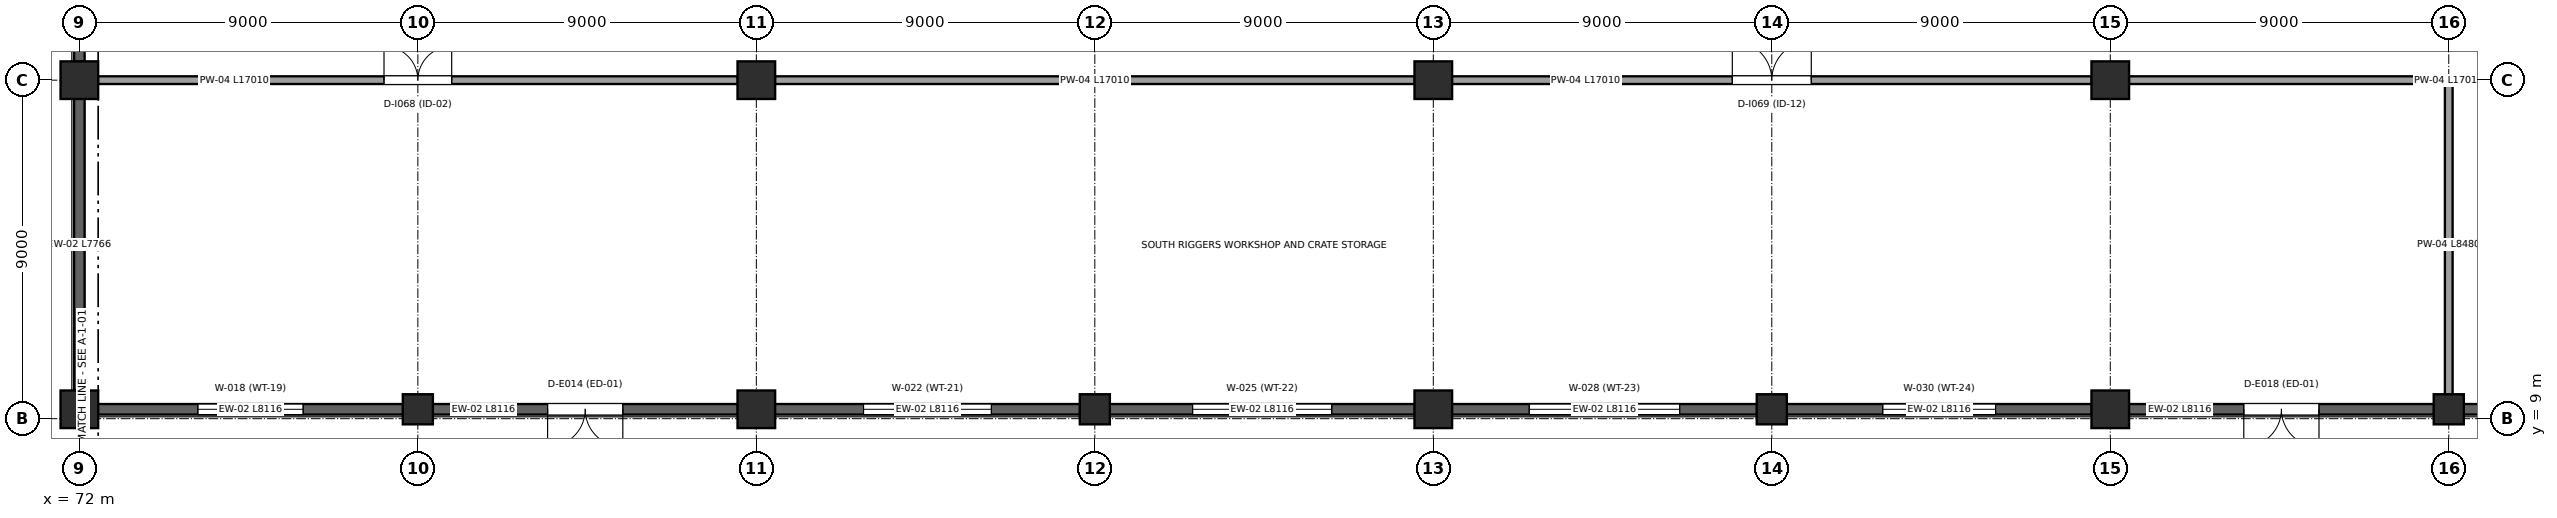
"""IFC4 building model, lengths in metres.
Left out: names, types, materials, properties, quantities, classifications, styles, units other than length and angle.
Written with IfcOpenShell. Run it as: python <this file> out.ifc"""

import sys

from ifc_helpers import new_model, si_unit, direction, frame, frame_2d, origin, origin_2d, place, context, subcontext, project, spatial, rectangle, extrude, element, fill, save


model = new_model("IFC4")
c1 = context("Model", 3, precision=1e-05, world=origin(), true_north=direction((0.0, 1.0)))
c2 = subcontext(c1, "Body", "Model", "MODEL_VIEW")
j1 = project(units=[si_unit("LENGTHUNIT", "METRE"), si_unit("PLANEANGLEUNIT", "RADIAN")], contexts=[c1])
p1 = place(None, origin())
s1 = spatial("IfcSite", under=j1, at=p1, CompositionType="ELEMENT")
p2 = place(p1, origin())
s2 = spatial("IfcBuilding", under=s1, at=p2, CompositionType="ELEMENT")
p3 = place(p2, origin())
s3 = spatial("IfcBuildingStorey", under=s2, at=p3, CompositionType="ELEMENT", Elevation=0.0)
for number, where, z_axis, x_axis in (
    (1, (72.0, 9.25, 0.0), (0.0, 0.0, 1.0), (1.0, 0.0, 0.0)),
    (2, (72.0, 18.0, 0.0), (0.0, 0.0, 1.0), (1.0, 0.0, 0.0)),
    (3, (90.0, 9.25, 0.0), (0.0, 0.0, 1.0), (1.0, 0.0, 0.0)),
    (4, (90.0, 18.0, 0.0), (0.0, 0.0, 1.0), (1.0, 0.0, 0.0)),
    (5, (108.0, 9.25, 0.0), (0.0, 0.0, 1.0), (1.0, 0.0, 0.0)),
    (6, (108.0, 18.0, 0.0), (0.0, 0.0, 1.0), (1.0, 0.0, 0.0)),
    (7, (126.0, 9.25, 0.0), (0.0, 0.0, 1.0), (1.0, 0.0, 0.0)),
    (8, (126.0, 18.0, 0.0), (0.0, 0.0, 1.0), (1.0, 0.0, 0.0)),
):
    element("IfcColumn", number, at=place(p3, frame(where, z_axis=z_axis, x_axis=x_axis)), inside=s3, PredefinedType="COLUMN", context=c2, shape_type="SweptSolid", body=[
        extrude(rectangle(XDim=1.0, YDim=1.0, at=origin_2d()), origin(), (0.0, 0.0, 1.0), 6.0),
    ])
for number, where, z_axis, x_axis in (
    (9, (81.0, 9.25, 0.0), (0.0, 0.0, 1.0), (1.0, 0.0, 0.0)),
    (10, (99.0, 9.25, 0.0), (0.0, 0.0, 1.0), (1.0, 0.0, 0.0)),
    (11, (117.0, 9.25, 0.0), (0.0, 0.0, 1.0), (1.0, 0.0, 0.0)),
    (12, (135.0, 9.25, 0.0), (0.0, 0.0, 1.0), (1.0, 0.0, 0.0)),
):
    element("IfcColumn", number, at=place(p3, frame(where, z_axis=z_axis, x_axis=x_axis)), inside=s3, PredefinedType="COLUMN", context=c2, shape_type="SweptSolid", body=[
        extrude(rectangle(XDim=0.8, YDim=0.8, at=origin_2d()), origin(), (0.0, 0.0, 1.0), 6.0),
    ])
p4 = place(p3, frame((80.608, 9.25, 0.0), z_axis=(0.0, 0.0, 1.0), x_axis=(-1.0, 0.0, 0.0)))
e13 = element("IfcWall", 13, at=p4, inside=s3, PredefinedType="STANDARD", context=c2, shape_type="SweptSolid", body=[
    extrude(rectangle(XDim=8.116, YDim=0.28, at=frame_2d((4.058, 0.0))), origin(), (0.0, 0.0, 1.0), 5.75),
])
p5 = place(p4, frame((2.658, 0.0, 2.6)))
e14 = element("IfcOpeningElement", 14, at=p5, cuts=e13, PredefinedType="OPENING", context=c2, shape_type="SweptSolid", body=[
    extrude(rectangle(XDim=2.8, YDim=1.25, at=frame_2d((1.4, 0.625))), frame((0.0, 0.15, 0.0), z_axis=(0.0, -1.0, 0.0), x_axis=(1.0, 0.0, 0.0)), (0.0, 0.0, 1.0), 0.3),
])
p6 = place(p3, frame((89.508, 9.25, 0.0), z_axis=(0.0, 0.0, 1.0), x_axis=(-1.0, 0.0, 0.0)))
e15 = element("IfcWall", 15, at=p6, inside=s3, PredefinedType="STANDARD", context=c2, shape_type="SweptSolid", body=[
    extrude(rectangle(XDim=8.116, YDim=0.28, at=frame_2d((4.058, 0.0))), origin(), (0.0, 0.0, 1.0), 5.75),
])
p7 = place(p6, frame((3.058, 0.0, 0.0)))
e16 = element("IfcOpeningElement", 16, at=p7, cuts=e15, PredefinedType="OPENING", context=c2, shape_type="SweptSolid", body=[
    extrude(rectangle(XDim=2.0, YDim=2.4, at=frame_2d((1.0, 1.2))), frame((0.0, 0.15, 0.0), z_axis=(0.0, -1.0, 0.0), x_axis=(1.0, 0.0, 0.0)), (0.0, 0.0, 1.0), 0.3),
])
p8 = place(p3, frame((98.608, 9.25, 0.0), z_axis=(0.0, 0.0, 1.0), x_axis=(-1.0, 0.0, 0.0)))
e17 = element("IfcWall", 17, at=p8, inside=s3, PredefinedType="STANDARD", context=c2, shape_type="SweptSolid", body=[
    extrude(rectangle(XDim=8.116, YDim=0.28, at=frame_2d((4.058, 0.0))), origin(), (0.0, 0.0, 1.0), 5.75),
])
p9 = place(p8, frame((2.358, 0.0, 2.6)))
e18 = element("IfcOpeningElement", 18, at=p9, cuts=e17, PredefinedType="OPENING", context=c2, shape_type="SweptSolid", body=[
    extrude(rectangle(XDim=3.4, YDim=1.25, at=frame_2d((1.7, 0.625))), frame((0.0, 0.15, 0.0), z_axis=(0.0, -1.0, 0.0), x_axis=(1.0, 0.0, 0.0)), (0.0, 0.0, 1.0), 0.3),
])
p10 = place(p3, frame((107.508, 9.25, 0.0), z_axis=(0.0, 0.0, 1.0), x_axis=(-1.0, 0.0, 0.0)))
e19 = element("IfcWall", 19, at=p10, inside=s3, PredefinedType="STANDARD", context=c2, shape_type="SweptSolid", body=[
    extrude(rectangle(XDim=8.116, YDim=0.28, at=frame_2d((4.058, 0.0))), origin(), (0.0, 0.0, 1.0), 5.75),
])
p11 = place(p10, frame((2.208, 0.0, 2.6)))
e20 = element("IfcOpeningElement", 20, at=p11, cuts=e19, PredefinedType="OPENING", context=c2, shape_type="SweptSolid", body=[
    extrude(rectangle(XDim=3.7, YDim=1.25, at=frame_2d((1.85, 0.625))), frame((0.0, 0.15, 0.0), z_axis=(0.0, -1.0, 0.0), x_axis=(1.0, 0.0, 0.0)), (0.0, 0.0, 1.0), 0.3),
])
p12 = place(p3, frame((116.608, 9.25, 0.0), z_axis=(0.0, 0.0, 1.0), x_axis=(-1.0, 0.0, 0.0)))
e21 = element("IfcWall", 21, at=p12, inside=s3, PredefinedType="STANDARD", context=c2, shape_type="SweptSolid", body=[
    extrude(rectangle(XDim=8.116, YDim=0.28, at=frame_2d((4.058, 0.0))), origin(), (0.0, 0.0, 1.0), 5.75),
])
p13 = place(p12, frame((2.058, 0.0, 2.6)))
e22 = element("IfcOpeningElement", 22, at=p13, cuts=e21, PredefinedType="OPENING", context=c2, shape_type="SweptSolid", body=[
    extrude(rectangle(XDim=4.0, YDim=1.25, at=frame_2d((2.0, 0.625))), frame((0.0, 0.15, 0.0), z_axis=(0.0, -1.0, 0.0), x_axis=(1.0, 0.0, 0.0)), (0.0, 0.0, 1.0), 0.3),
])
p14 = place(p3, frame((125.508, 9.25, 0.0), z_axis=(0.0, 0.0, 1.0), x_axis=(-1.0, 0.0, 0.0)))
e23 = element("IfcWall", 23, at=p14, inside=s3, PredefinedType="STANDARD", context=c2, shape_type="SweptSolid", body=[
    extrude(rectangle(XDim=8.116, YDim=0.28, at=frame_2d((4.058, 0.0))), origin(), (0.0, 0.0, 1.0), 5.75),
])
p15 = place(p14, frame((2.558, 0.0, 2.6)))
e24 = element("IfcOpeningElement", 24, at=p15, cuts=e23, PredefinedType="OPENING", context=c2, shape_type="SweptSolid", body=[
    extrude(rectangle(XDim=3.0, YDim=1.45, at=frame_2d((1.5, 0.725))), frame((0.0, 0.15, 0.0), z_axis=(0.0, -1.0, 0.0), x_axis=(1.0, 0.0, 0.0)), (0.0, 0.0, 1.0), 0.3),
])
p16 = place(p3, frame((134.608, 9.25, 0.0), z_axis=(0.0, 0.0, 1.0), x_axis=(-1.0, 0.0, 0.0)))
e25 = element("IfcWall", 25, at=p16, inside=s3, PredefinedType="STANDARD", context=c2, shape_type="SweptSolid", body=[
    extrude(rectangle(XDim=8.116, YDim=0.28, at=frame_2d((4.058, 0.0))), origin(), (0.0, 0.0, 1.0), 5.75),
])
p17 = place(p16, frame((3.058, 0.0, 0.0)))
e26 = element("IfcOpeningElement", 26, at=p17, cuts=e25, PredefinedType="OPENING", context=c2, shape_type="SweptSolid", body=[
    extrude(rectangle(XDim=2.0, YDim=2.4, at=frame_2d((1.0, 1.2))), frame((0.0, 0.15, 0.0), z_axis=(0.0, -1.0, 0.0), x_axis=(1.0, 0.0, 0.0)), (0.0, 0.0, 1.0), 0.3),
])
p18 = place(p3, frame((143.508, 9.25, 0.0), z_axis=(0.0, 0.0, 1.0), x_axis=(-1.0, 0.0, 0.0)))
e27 = element("IfcWall", 27, at=p18, inside=s3, PredefinedType="STANDARD", context=c2, shape_type="SweptSolid", body=[
    extrude(rectangle(XDim=8.116, YDim=0.28, at=frame_2d((4.058, 0.0))), origin(), (0.0, 0.0, 1.0), 5.75),
])
p19 = place(p18, frame((2.258, 0.0, 2.6)))
e28 = element("IfcOpeningElement", 28, at=p19, cuts=e27, PredefinedType="OPENING", context=c2, shape_type="SweptSolid", body=[
    extrude(rectangle(XDim=3.6, YDim=1.45, at=frame_2d((1.8, 0.725))), frame((0.0, 0.15, 0.0), z_axis=(0.0, -1.0, 0.0), x_axis=(1.0, 0.0, 0.0)), (0.0, 0.0, 1.0), 0.3),
])
p20 = place(p3, frame((72.0, 9.742, 0.0), z_axis=(0.0, 0.0, 1.0), x_axis=(0.0, 1.0, 0.0)))
e29 = element("IfcWall", 29, at=p20, inside=s3, PredefinedType="STANDARD", context=c2, shape_type="SweptSolid", body=[
    extrude(rectangle(XDim=7.766, YDim=0.28, at=frame_2d((3.883, 0.0))), origin(), (0.0, 0.0, 1.0), 5.75),
])
p21 = place(p3, frame((72.0, 18.492, 0.0), z_axis=(0.0, 0.0, 1.0), x_axis=(0.0, 1.0, 0.0)))
e30 = element("IfcWall", 30, at=p21, inside=s3, PredefinedType="STANDARD", context=c2, shape_type="SweptSolid", body=[
    extrude(rectangle(XDim=8.016, YDim=0.28, at=frame_2d((4.008, 0.0))), origin(), (0.0, 0.0, 1.0), 6.0),
])
p22 = place(p21, frame((2.908, 0.0, 0.0)))
e31 = element("IfcOpeningElement", 31, at=p22, cuts=e30, PredefinedType="OPENING", context=c2, shape_type="SweptSolid", body=[
    extrude(rectangle(XDim=2.2, YDim=2.5, at=frame_2d((1.1, 1.25))), frame((0.0, 0.15, 0.0), z_axis=(0.0, -1.0, 0.0), x_axis=(1.0, 0.0, 0.0)), (0.0, 0.0, 1.0), 0.3),
])
p23 = place(p3, frame((72.495, 18.0, 0.0), z_axis=(0.0, 0.0, 1.0), x_axis=(1.0, 0.0, 0.0)))
e32 = element("IfcWall", 32, at=p23, inside=s3, PredefinedType="PARTITIONING", context=c2, shape_type="SweptSolid", body=[
    extrude(rectangle(XDim=17.01, YDim=0.205, at=frame_2d((8.505, 0.0))), origin(), (0.0, 0.0, 1.0), 4.65),
])
p24 = place(p23, frame((7.605, 0.0, 0.0)))
e33 = element("IfcOpeningElement", 33, at=p24, cuts=e32, PredefinedType="OPENING", context=c2, shape_type="SweptSolid", body=[
    extrude(rectangle(XDim=1.8, YDim=2.3, at=frame_2d((0.9, 1.15))), frame((0.0, 0.113, 0.0), z_axis=(0.0, -1.0, 0.0), x_axis=(1.0, 0.0, 0.0)), (0.0, 0.0, 1.0), 0.225),
])
p25 = place(p3, frame((90.495, 18.0, 0.0), z_axis=(0.0, 0.0, 1.0), x_axis=(1.0, 0.0, 0.0)))
e34 = element("IfcWall", 34, at=p25, inside=s3, PredefinedType="PARTITIONING", context=c2, shape_type="SweptSolid", body=[
    extrude(rectangle(XDim=17.01, YDim=0.205, at=frame_2d((8.505, 0.0))), origin(), (0.0, 0.0, 1.0), 4.65),
])
p26 = place(p3, frame((108.495, 18.0, 0.0), z_axis=(0.0, 0.0, 1.0), x_axis=(1.0, 0.0, 0.0)))
e35 = element("IfcWall", 35, at=p26, inside=s3, PredefinedType="PARTITIONING", context=c2, shape_type="SweptSolid", body=[
    extrude(rectangle(XDim=17.01, YDim=0.205, at=frame_2d((8.505, 0.0))), origin(), (0.0, 0.0, 1.0), 4.65),
])
p27 = place(p26, frame((7.455, 0.0, 0.0)))
e36 = element("IfcOpeningElement", 36, at=p27, cuts=e35, PredefinedType="OPENING", context=c2, shape_type="SweptSolid", body=[
    extrude(rectangle(XDim=2.1, YDim=2.45, at=frame_2d((1.05, 1.225))), frame((0.0, 0.113, 0.0), z_axis=(0.0, -1.0, 0.0), x_axis=(1.0, 0.0, 0.0)), (0.0, 0.0, 1.0), 0.225),
])
p28 = place(p3, frame((126.495, 18.0, 0.0), z_axis=(0.0, 0.0, 1.0), x_axis=(1.0, 0.0, 0.0)))
e37 = element("IfcWall", 37, at=p28, inside=s3, PredefinedType="PARTITIONING", context=c2, shape_type="SweptSolid", body=[
    extrude(rectangle(XDim=17.01, YDim=0.205, at=frame_2d((8.505, 0.0))), origin(), (0.0, 0.0, 1.0), 4.65),
])
p29 = place(p3, frame((135.0, 9.4, 0.0), z_axis=(0.0, 0.0, 1.0), x_axis=(0.0, 1.0, 0.0)))
e38 = element("IfcWall", 38, at=p29, inside=s3, PredefinedType="PARTITIONING", context=c2, shape_type="SweptSolid", body=[
    extrude(rectangle(XDim=8.48, YDim=0.205, at=frame_2d((4.24, 0.0))), origin(), (0.0, 0.0, 1.0), 4.65),
])
p30 = place(p5, origin())
e39 = element("IfcWindow", 39, at=p30, inside=s3, PartitioningType="SINGLE_PANEL", PredefinedType="WINDOW", context=c2, shape_type="SweptSolid", body=[
    extrude(rectangle(XDim=2.8, YDim=1.25, at=frame_2d((1.4, 0.625))), frame((0.0, 0.03, 0.0), z_axis=(0.0, -1.0, 0.0), x_axis=(1.0, 0.0, 0.0)), (0.0, 0.0, 1.0), 0.06),
])
fill(e14, e39)
p31 = place(p7, origin())
e40 = element("IfcDoor", 40, at=p31, inside=s3, OperationType="DOUBLE_DOOR_SINGLE_SWING", PredefinedType="DOOR", context=c2, shape_type="SweptSolid", body=[
    extrude(rectangle(XDim=2.0, YDim=2.4, at=frame_2d((1.0, 1.2))), frame((0.0, 0.025, 0.0), z_axis=(0.0, -1.0, 0.0), x_axis=(1.0, 0.0, 0.0)), (0.0, 0.0, 1.0), 0.05),
])
fill(e16, e40)
p32 = place(p9, origin())
e41 = element("IfcWindow", 41, at=p32, inside=s3, PartitioningType="SINGLE_PANEL", PredefinedType="WINDOW", context=c2, shape_type="SweptSolid", body=[
    extrude(rectangle(XDim=3.4, YDim=1.25, at=frame_2d((1.7, 0.625))), frame((0.0, 0.03, 0.0), z_axis=(0.0, -1.0, 0.0), x_axis=(1.0, 0.0, 0.0)), (0.0, 0.0, 1.0), 0.06),
])
fill(e18, e41)
p33 = place(p11, origin())
e42 = element("IfcWindow", 42, at=p33, inside=s3, PartitioningType="SINGLE_PANEL", PredefinedType="WINDOW", context=c2, shape_type="SweptSolid", body=[
    extrude(rectangle(XDim=3.7, YDim=1.25, at=frame_2d((1.85, 0.625))), frame((0.0, 0.03, 0.0), z_axis=(0.0, -1.0, 0.0), x_axis=(1.0, 0.0, 0.0)), (0.0, 0.0, 1.0), 0.06),
])
fill(e20, e42)
p34 = place(p13, origin())
e43 = element("IfcWindow", 43, at=p34, inside=s3, PartitioningType="SINGLE_PANEL", PredefinedType="WINDOW", context=c2, shape_type="SweptSolid", body=[
    extrude(rectangle(XDim=4.0, YDim=1.25, at=frame_2d((2.0, 0.625))), frame((0.0, 0.03, 0.0), z_axis=(0.0, -1.0, 0.0), x_axis=(1.0, 0.0, 0.0)), (0.0, 0.0, 1.0), 0.06),
])
fill(e22, e43)
p35 = place(p15, origin())
e44 = element("IfcWindow", 44, at=p35, inside=s3, PartitioningType="SINGLE_PANEL", PredefinedType="WINDOW", context=c2, shape_type="SweptSolid", body=[
    extrude(rectangle(XDim=3.0, YDim=1.45, at=frame_2d((1.5, 0.725))), frame((0.0, 0.03, 0.0), z_axis=(0.0, -1.0, 0.0), x_axis=(1.0, 0.0, 0.0)), (0.0, 0.0, 1.0), 0.06),
])
fill(e24, e44)
p36 = place(p17, origin())
e45 = element("IfcDoor", 45, at=p36, inside=s3, OperationType="DOUBLE_DOOR_SINGLE_SWING", PredefinedType="DOOR", context=c2, shape_type="SweptSolid", body=[
    extrude(rectangle(XDim=2.0, YDim=2.4, at=frame_2d((1.0, 1.2))), frame((0.0, 0.025, 0.0), z_axis=(0.0, -1.0, 0.0), x_axis=(1.0, 0.0, 0.0)), (0.0, 0.0, 1.0), 0.05),
])
fill(e26, e45)
p37 = place(p24, origin())
e46 = element("IfcDoor", 46, at=p37, inside=s3, OperationType="DOUBLE_DOOR_SINGLE_SWING", PredefinedType="DOOR", context=c2, shape_type="SweptSolid", body=[
    extrude(rectangle(XDim=1.8, YDim=2.3, at=frame_2d((0.9, 1.15))), frame((0.0, 0.025, 0.0), z_axis=(0.0, -1.0, 0.0), x_axis=(1.0, 0.0, 0.0)), (0.0, 0.0, 1.0), 0.05),
])
fill(e33, e46)
p38 = place(p27, origin())
e47 = element("IfcDoor", 47, at=p38, inside=s3, OperationType="DOUBLE_DOOR_SINGLE_SWING", PredefinedType="DOOR", context=c2, shape_type="SweptSolid", body=[
    extrude(rectangle(XDim=2.1, YDim=2.45, at=frame_2d((1.05, 1.225))), frame((0.0, 0.025, 0.0), z_axis=(0.0, -1.0, 0.0), x_axis=(1.0, 0.0, 0.0)), (0.0, 0.0, 1.0), 0.05),
])
fill(e36, e47)
save(model, sys.argv[1])
